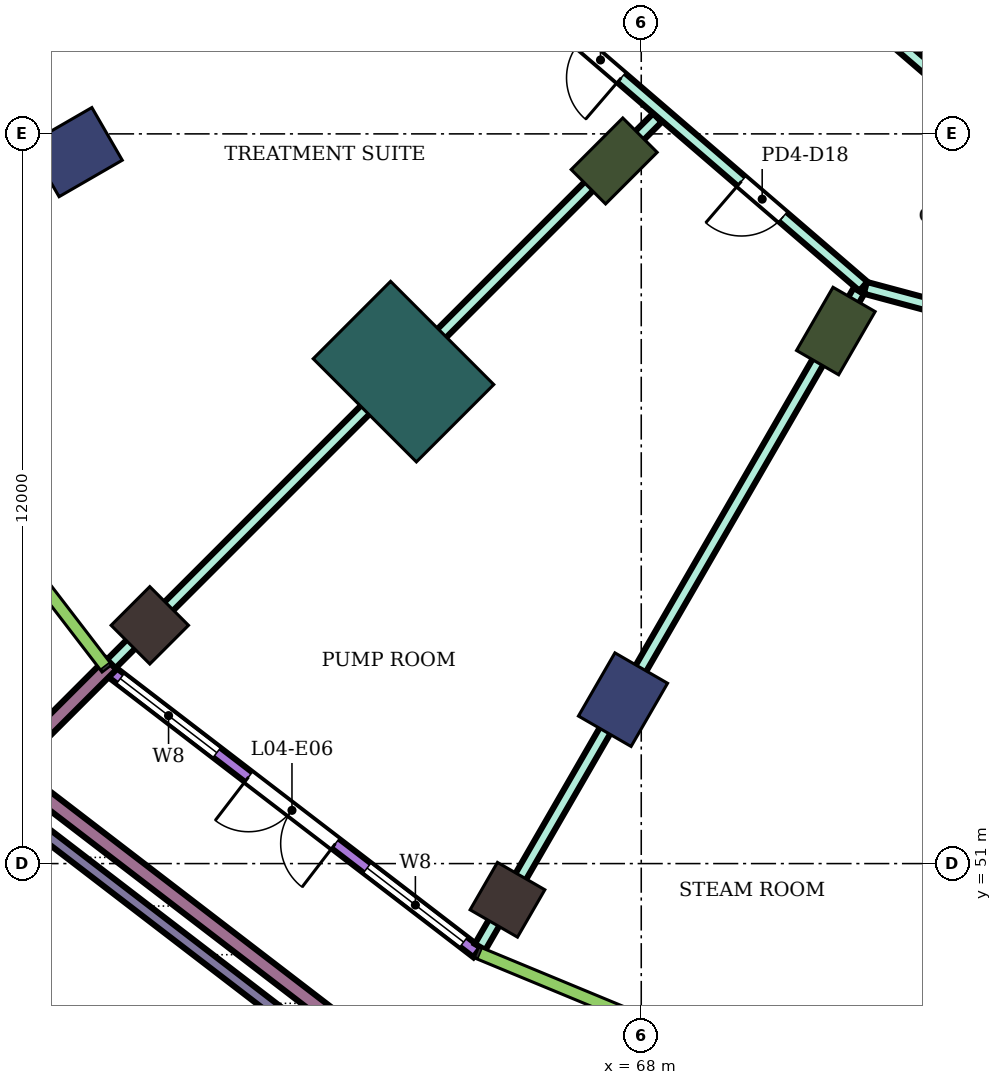
"""IFC4 building model, lengths in metres.
Left out: names, types, materials, properties, quantities, classifications, styles, units other than length and angle.
Written with IfcOpenShell. Run it as: python <this file> out.ifc"""

import sys

from ifc_helpers import new_model, si_unit, direction, frame, frame_2d, origin, origin_2d, place, context, subcontext, project, spatial, rectangle, extrude, element, fill, save


model = new_model("IFC4")
c1 = context("Model", 3, precision=1e-05, world=origin(), true_north=direction((0.0, 1.0)))
c2 = subcontext(c1, "Body", "Model", "MODEL_VIEW")
j1 = project(units=[si_unit("LENGTHUNIT", "METRE"), si_unit("PLANEANGLEUNIT", "RADIAN")], contexts=[c1])
p1 = place(None, origin())
s1 = spatial("IfcSite", under=j1, at=p1, CompositionType="ELEMENT")
p2 = place(p1, origin())
s2 = spatial("IfcBuilding", under=s1, at=p2, CompositionType="ELEMENT")
p3 = place(p2, frame((0.0, 0.0, 23.8)))
s3 = spatial("IfcBuildingStorey", under=s2, at=p3, CompositionType="ELEMENT", Elevation=23.8)
for number, where, z_axis, x_axis in (
    (1, (59.918, 54.918, 0.0), (0.0, 0.0, 1.0), (-0.707, -0.707, 0.0)),
    (2, (65.8, 50.405, 0.0), (0.0, 0.0, 1.0), (-0.5, -0.866, 0.0)),
):
    element("IfcColumn", number, at=place(p3, frame(where, z_axis=z_axis, x_axis=x_axis)), inside=s3, PredefinedType="COLUMN", context=c2, shape_type="SweptSolid", body=[
        extrude(rectangle(XDim=0.9, YDim=0.9, at=origin_2d()), origin(), (0.0, 0.0, 1.0), 5.0),
    ])
for number, where, z_axis, x_axis in (
    (3, (58.696, 62.7, 0.0), (0.0, 0.0, 1.0), (-0.866, -0.5, 0.0)),
    (4, (67.7, 53.696, 0.0), (0.0, 0.0, 1.0), (-0.5, -0.866, 0.0)),
):
    element("IfcColumn", number, at=place(p3, frame(where, z_axis=z_axis, x_axis=x_axis)), inside=s3, PredefinedType="COLUMN", context=c2, shape_type="SweptSolid", body=[
        extrude(rectangle(XDim=1.2, YDim=1.0, at=origin_2d()), origin(), (0.0, 0.0, 1.0), 5.0),
    ])
for number, where, z_axis, x_axis in (
    (5, (67.555, 62.555, 0.0), (0.0, 0.0, 1.0), (-0.707, -0.707, 0.0)),
    (6, (71.2, 59.758, 0.0), (0.0, 0.0, 1.0), (-0.5, -0.866, 0.0)),
):
    element("IfcColumn", number, at=place(p3, frame(where, z_axis=z_axis, x_axis=x_axis)), inside=s3, PredefinedType="COLUMN", context=c2, shape_type="SweptSolid", body=[
        extrude(rectangle(XDim=1.2, YDim=0.8, at=origin_2d()), origin(), (0.0, 0.0, 1.0), 5.0),
    ])
p4 = place(p3, frame((64.09, 59.09, 0.0), z_axis=(0.0, 0.0, 1.0), x_axis=(-0.707106781187, -0.707106781187, 0.0)))
e7 = element("IfcColumn", 7, at=p4, inside=s3, PredefinedType="COLUMN", context=c2, shape_type="SweptSolid", body=[
    extrude(rectangle(XDim=1.8, YDim=2.4, at=origin_2d()), origin(), (0.0, 0.0, 1.0), 5.0),
])
p5 = place(p3, frame((59.212, 54.212, 0.0), z_axis=(0.0, 0.0, 1.0), x_axis=(0.793355415567, -0.608758724447, 0.0)))
e8 = element("IfcWall", 8, at=p5, inside=s3, PredefinedType="NOTDEFINED", context=c2, shape_type="SweptSolid", body=[
    extrude(rectangle(XDim=7.675, YDim=0.2, at=frame_2d((3.837, 0.0))), origin(), (0.0, 0.0, 1.0), 5.0),
])
p6 = place(p5, frame((0.279, 0.0, 0.9)))
e9 = element("IfcOpeningElement", 9, at=p6, cuts=e8, PredefinedType="OPENING", context=c2, shape_type="SweptSolid", body=[
    extrude(rectangle(XDim=2.0, YDim=2.1, at=frame_2d((1.0, 1.05))), frame((0.0, 0.11, 0.0), z_axis=(0.0, -1.0, 0.0), x_axis=(1.0, 0.0, 0.0)), (0.0, 0.0, 1.0), 0.22),
])
p7 = place(p5, frame((2.937, 0.0, 0.0)))
e10 = element("IfcOpeningElement", 10, at=p7, cuts=e8, PredefinedType="OPENING", context=c2, shape_type="SweptSolid", body=[
    extrude(rectangle(XDim=1.8, YDim=2.4, at=frame_2d((0.9, 1.2))), frame((0.0, 0.11, 0.0), z_axis=(0.0, -1.0, 0.0), x_axis=(1.0, 0.0, 0.0)), (0.0, 0.0, 1.0), 0.22),
])
p8 = place(p5, frame((5.396, 0.0, 0.9)))
e11 = element("IfcOpeningElement", 11, at=p8, cuts=e8, PredefinedType="OPENING", context=c2, shape_type="SweptSolid", body=[
    extrude(rectangle(XDim=2.0, YDim=2.1, at=frame_2d((1.0, 1.05))), frame((0.0, 0.11, 0.0), z_axis=(0.0, -1.0, 0.0), x_axis=(1.0, 0.0, 0.0)), (0.0, 0.0, 1.0), 0.22),
])
p9 = place(p3, frame((63.891, 47.124, 0.0), z_axis=(0.0, 0.0, 1.0), x_axis=(-0.793350233536, 0.60876547779, 0.0)))
e12 = element("IfcWall", 12, at=p9, inside=s3, PredefinedType="PARAPET", context=c2, shape_type="SweptSolid", body=[
    extrude(rectangle(XDim=8.379, YDim=0.2, at=frame_2d((4.189, 0.0))), origin(), (0.0, 0.0, 1.0), 1.1),
])
p10 = place(p3, frame((59.283, 54.283, 0.0), z_axis=(0.0, 0.0, 1.0), x_axis=(-0.707106781187, -0.707106781187, 0.0)))
e13 = element("IfcWall", 13, at=p10, inside=s3, PredefinedType="USERDEFINED", context=c2, shape_type="SweptSolid", body=[
    extrude(rectangle(XDim=2.278, YDim=0.25, at=frame_2d((1.139, 0.0))), origin(), (0.0, 0.0, 1.0), 0.6),
])
p11 = place(p3, frame((64.127, 47.541, 0.0), z_axis=(0.0, 0.0, 1.0), x_axis=(-0.793340216104, 0.608778532401, 0.0)))
e14 = element("IfcWall", 14, at=p11, inside=s3, PredefinedType="USERDEFINED", context=c2, shape_type="SweptSolid", body=[
    extrude(rectangle(XDim=8.256, YDim=0.25, at=frame_2d((4.128, 0.0))), origin(), (0.0, 0.0, 1.0), 0.6),
])
p12 = place(p3, frame((59.283, 54.284, 0.0), z_axis=(0.0, 0.0, 1.0), x_axis=(0.707106781187, 0.707106781187, 0.0)))
e15 = element("IfcWall", 15, at=p12, inside=s3, PredefinedType="PARTITIONING", context=c2, shape_type="SweptSolid", body=[
    extrude(rectangle(XDim=12.702, YDim=0.2, at=frame_2d((6.351, 0.0))), origin(), (0.0, 0.0, 1.0), 4.55),
])
p13 = place(p3, frame((65.35, 49.628, 0.0), z_axis=(0.0, 0.0, 1.0), x_axis=(0.500053262448, 0.865994650512, 0.0)))
e16 = element("IfcWall", 16, at=p13, inside=s3, PredefinedType="PARTITIONING", context=c2, shape_type="SweptSolid", body=[
    extrude(rectangle(XDim=12.457, YDim=0.2, at=frame_2d((6.229, 0.0))), origin(), (0.0, 0.0, 1.0), 4.55),
])
p14 = place(p3, frame((66.302, 65.1, 0.0), z_axis=(0.0, 0.0, 1.0), x_axis=(0.757895579626, -0.652375881209, 0.0)))
e17 = element("IfcWall", 17, at=p14, inside=s3, PredefinedType="PARTITIONING", context=c2, shape_type="SweptSolid", body=[
    extrude(rectangle(XDim=7.062, YDim=0.2, at=frame_2d((3.531, 0.0))), origin(), (0.0, 0.0, 1.0), 4.55),
])
p15 = place(p14, frame((4.414, 0.0, 0.0)))
e18 = element("IfcOpeningElement", 18, at=p15, cuts=e17, PredefinedType="OPENING", context=c2, shape_type="SweptSolid", body=[
    extrude(rectangle(XDim=0.9, YDim=2.1, at=frame_2d((0.45, 1.05))), frame((0.0, 0.11, 0.0), z_axis=(0.0, -1.0, 0.0), x_axis=(1.0, 0.0, 0.0)), (0.0, 0.0, 1.0), 0.22),
])
p16 = place(p14, frame((0.906, 0.0, 0.0)))
e19 = element("IfcOpeningElement", 19, at=p16, cuts=e17, PredefinedType="OPENING", context=c2, shape_type="SweptSolid", body=[
    extrude(rectangle(XDim=0.9, YDim=2.1, at=frame_2d((0.45, 1.05))), frame((0.0, 0.11, 0.0), z_axis=(0.0, -1.0, 0.0), x_axis=(1.0, 0.0, 0.0)), (0.0, 0.0, 1.0), 0.22),
])
p17 = place(p3, frame((69.771, 66.6, 0.0), z_axis=(0.0, 0.0, 1.0), x_axis=(0.758040611529, -0.652207352974, 0.0)))
e20 = element("IfcWall", 20, at=p17, inside=s3, PredefinedType="PARTITIONING", context=c2, shape_type="SweptSolid", body=[
    extrude(rectangle(XDim=4.625, YDim=0.2, at=frame_2d((2.312, 0.0))), origin(), (0.0, 0.0, 1.0), 4.55),
])
p18 = place(p17, frame((1.887, 0.0, 0.0)))
e21 = element("IfcOpeningElement", 21, at=p18, cuts=e20, PredefinedType="OPENING", context=c2, shape_type="SweptSolid", body=[
    extrude(rectangle(XDim=0.9, YDim=2.1, at=frame_2d((0.45, 1.05))), frame((0.0, 0.11, 0.0), z_axis=(0.0, -1.0, 0.0), x_axis=(1.0, 0.0, 0.0)), (0.0, 0.0, 1.0), 0.22),
])
p19 = place(p3, frame((71.685, 60.468, 0.0), z_axis=(0.0, 0.0, 1.0), x_axis=(0.96590736437, -0.258887936097, 0.0)))
e22 = element("IfcWall", 22, at=p19, inside=s3, PredefinedType="PARTITIONING", context=c2, shape_type="SweptSolid", body=[
    extrude(rectangle(XDim=8.519, YDim=0.2, at=frame_2d((4.259, 0.0))), origin(), (0.0, 0.0, 1.0), 4.55),
])
p20 = place(p19, frame((5.979, 0.0, 0.0)))
e23 = element("IfcOpeningElement", 23, at=p20, cuts=e22, PredefinedType="OPENING", context=c2, shape_type="SweptSolid", body=[
    extrude(rectangle(XDim=0.9, YDim=2.1, at=frame_2d((0.45, 1.05))), frame((0.0, 0.11, 0.0), z_axis=(0.0, -1.0, 0.0), x_axis=(1.0, 0.0, 0.0)), (0.0, 0.0, 1.0), 0.22),
])
p21 = place(p19, frame((1.695, 0.0, 0.0)))
e24 = element("IfcOpeningElement", 24, at=p21, cuts=e22, PredefinedType="OPENING", context=c2, shape_type="SweptSolid", body=[
    extrude(rectangle(XDim=0.9, YDim=2.1, at=frame_2d((0.45, 1.05))), frame((0.0, 0.11, 0.0), z_axis=(0.0, -1.0, 0.0), x_axis=(1.0, 0.0, 0.0)), (0.0, 0.0, 1.0), 0.22),
])
p22 = place(p3, frame((72.416, 46.701, 0.0), z_axis=(0.0, 0.0, 1.0), x_axis=(0.258857408966, 0.965915545906, 0.0)))
e25 = element("IfcWall", 25, at=p22, inside=s3, PredefinedType="PARTITIONING", context=c2, shape_type="SweptSolid", body=[
    extrude(rectangle(XDim=13.009, YDim=0.2, at=frame_2d((6.504, 0.0))), origin(), (0.0, 0.0, 1.0), 4.55),
])
p23 = place(p6, origin())
e26 = element("IfcWindow", 26, at=p23, inside=s3, PartitioningType="SINGLE_PANEL", PredefinedType="WINDOW", context=c2, shape_type="SweptSolid", body=[
    extrude(rectangle(XDim=2.0, YDim=2.1, at=frame_2d((1.0, 1.05))), frame((0.0, 0.03, 0.0), z_axis=(0.0, -1.0, 0.0), x_axis=(1.0, 0.0, 0.0)), (0.0, 0.0, 1.0), 0.06),
])
fill(e9, e26)
p24 = place(p7, frame((1.8, 0.0, 0.0), z_axis=(0.0, 0.0, 1.0), x_axis=(-1.0, 0.0, 0.0)))
e27 = element("IfcDoor", 27, at=p24, inside=s3, OperationType="DOUBLE_DOOR_SINGLE_SWING", PredefinedType="DOOR", context=c2, shape_type="SweptSolid", body=[
    extrude(rectangle(XDim=1.8, YDim=2.4, at=frame_2d((0.9, 1.2))), frame((0.0, 0.025, 0.0), z_axis=(0.0, -1.0, 0.0), x_axis=(1.0, 0.0, 0.0)), (0.0, 0.0, 1.0), 0.05),
])
fill(e10, e27)
p25 = place(p8, origin())
e28 = element("IfcWindow", 28, at=p25, inside=s3, PartitioningType="SINGLE_PANEL", PredefinedType="WINDOW", context=c2, shape_type="SweptSolid", body=[
    extrude(rectangle(XDim=2.0, YDim=2.1, at=frame_2d((1.0, 1.05))), frame((0.0, 0.03, 0.0), z_axis=(0.0, -1.0, 0.0), x_axis=(1.0, 0.0, 0.0)), (0.0, 0.0, 1.0), 0.06),
])
fill(e11, e28)
p26 = place(p15, frame((0.9, 0.0, 0.0), z_axis=(0.0, 0.0, 1.0), x_axis=(-1.0, 0.0, 0.0)))
e29 = element("IfcDoor", 29, at=p26, inside=s3, OperationType="SINGLE_SWING_RIGHT", PredefinedType="DOOR", context=c2, shape_type="SweptSolid", body=[
    extrude(rectangle(XDim=0.9, YDim=2.1, at=frame_2d((0.45, 1.05))), frame((0.0, 0.025, 0.0), z_axis=(0.0, -1.0, 0.0), x_axis=(1.0, 0.0, 0.0)), (0.0, 0.0, 1.0), 0.05),
])
fill(e18, e29)
p27 = place(p16, frame((0.9, 0.0, 0.0), z_axis=(0.0, 0.0, 1.0), x_axis=(-1.0, 0.0, 0.0)))
e30 = element("IfcDoor", 30, at=p27, inside=s3, OperationType="SINGLE_SWING_LEFT", PredefinedType="DOOR", context=c2, shape_type="SweptSolid", body=[
    extrude(rectangle(XDim=0.9, YDim=2.1, at=frame_2d((0.45, 1.05))), frame((0.0, 0.025, 0.0), z_axis=(0.0, -1.0, 0.0), x_axis=(1.0, 0.0, 0.0)), (0.0, 0.0, 1.0), 0.05),
])
fill(e19, e30)
save(model, sys.argv[1])
